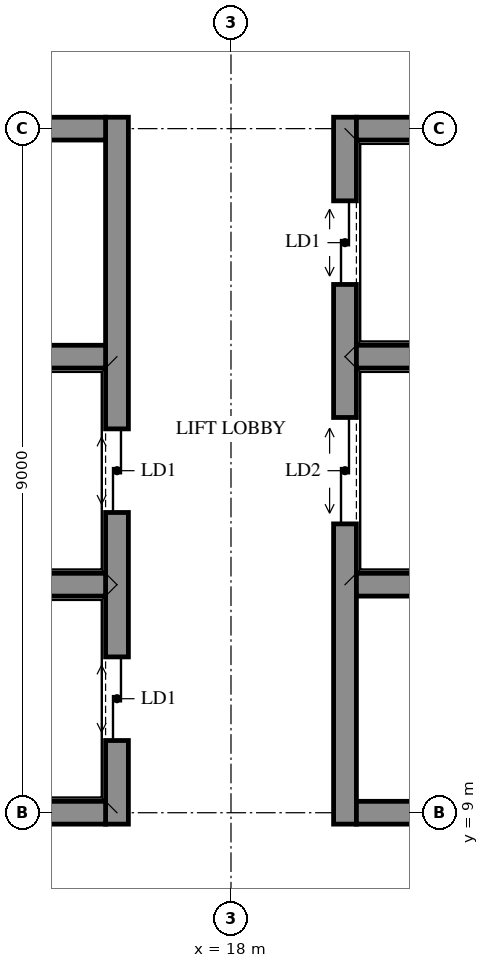
"""IFC4 building model, lengths in metres.
Left out: names, types, materials, properties, quantities, classifications, styles, units other than length and angle.
Written with IfcOpenShell. Run it as: python <this file> out.ifc"""

import sys

from ifc_helpers import new_model, si_unit, direction, frame, frame_2d, origin, place, context, subcontext, project, spatial, rectangle, extrude, element, fill, save


model = new_model("IFC4")
c1 = context("Model", 3, precision=1e-05, world=origin(), true_north=direction((0.0, 1.0)))
c2 = subcontext(c1, "Body", "Model", "MODEL_VIEW")
j1 = project(units=[si_unit("LENGTHUNIT", "METRE"), si_unit("PLANEANGLEUNIT", "RADIAN")], contexts=[c1])
p1 = place(None, origin())
s1 = spatial("IfcSite", under=j1, at=p1, CompositionType="ELEMENT")
p2 = place(p1, origin())
s2 = spatial("IfcBuilding", under=s1, at=p2, CompositionType="ELEMENT")
p3 = place(p2, frame((0.0, 0.0, 27.6)))
s3 = spatial("IfcBuildingStorey", under=s2, at=p3, CompositionType="ELEMENT", Elevation=27.6)
p4 = place(p3, frame((16.5, 8.85, 0.0), z_axis=(0.0, 0.0, 1.0), x_axis=(0.0, 1.0, 0.0)))
e1 = element("IfcWall", 1, at=p4, inside=s3, PredefinedType="SHEAR", context=c2, shape_type="SweptSolid", body=[
    extrude(rectangle(XDim=9.3, YDim=0.3, at=frame_2d((4.65, 0.0))), origin(), (0.0, 0.0, 1.0), 4.2),
])
p5 = place(p4, frame((1.1, 0.0, 0.0)))
e2 = element("IfcOpeningElement", 2, at=p5, cuts=e1, PredefinedType="OPENING", context=c2, shape_type="SweptSolid", body=[
    extrude(rectangle(XDim=1.1, YDim=2.1, at=frame_2d((0.55, 1.05))), frame((0.0, 0.16, 0.0), z_axis=(0.0, -1.0, 0.0), x_axis=(1.0, 0.0, 0.0)), (0.0, 0.0, 1.0), 0.32),
])
p6 = place(p4, frame((4.1, 0.0, 0.0)))
e3 = element("IfcOpeningElement", 3, at=p6, cuts=e1, PredefinedType="OPENING", context=c2, shape_type="SweptSolid", body=[
    extrude(rectangle(XDim=1.1, YDim=2.1, at=frame_2d((0.55, 1.05))), frame((0.0, 0.16, 0.0), z_axis=(0.0, -1.0, 0.0), x_axis=(1.0, 0.0, 0.0)), (0.0, 0.0, 1.0), 0.32),
])
p7 = place(p3, frame((19.5, 8.85, 0.0), z_axis=(0.0, 0.0, 1.0), x_axis=(0.0, 1.0, 0.0)))
e4 = element("IfcWall", 4, at=p7, inside=s3, PredefinedType="SHEAR", context=c2, shape_type="SweptSolid", body=[
    extrude(rectangle(XDim=9.3, YDim=0.3, at=frame_2d((4.65, 0.0))), origin(), (0.0, 0.0, 1.0), 4.2),
])
p8 = place(p7, frame((3.95, 0.0, 0.0)))
e5 = element("IfcOpeningElement", 5, at=p8, cuts=e4, PredefinedType="OPENING", context=c2, shape_type="SweptSolid", body=[
    extrude(rectangle(XDim=1.4, YDim=2.1, at=frame_2d((0.7, 1.05))), frame((0.0, 0.16, 0.0), z_axis=(0.0, -1.0, 0.0), x_axis=(1.0, 0.0, 0.0)), (0.0, 0.0, 1.0), 0.32),
])
p9 = place(p7, frame((7.1, 0.0, 0.0)))
e6 = element("IfcOpeningElement", 6, at=p9, cuts=e4, PredefinedType="OPENING", context=c2, shape_type="SweptSolid", body=[
    extrude(rectangle(XDim=1.1, YDim=2.1, at=frame_2d((0.55, 1.05))), frame((0.0, 0.16, 0.0), z_axis=(0.0, -1.0, 0.0), x_axis=(1.0, 0.0, 0.0)), (0.0, 0.0, 1.0), 0.32),
])
for number, where, z_axis, x_axis in (
    (7, (13.65, 9.0, 0.0), (0.0, 0.0, 1.0), (1.0, 0.0, 0.0)),
    (8, (19.65, 9.0, 0.0), (0.0, 0.0, 1.0), (1.0, 0.0, 0.0)),
    (9, (13.65, 12.0, 0.0), (0.0, 0.0, 1.0), (1.0, 0.0, 0.0)),
    (10, (19.65, 12.0, 0.0), (0.0, 0.0, 1.0), (1.0, 0.0, 0.0)),
    (11, (13.65, 15.0, 0.0), (0.0, 0.0, 1.0), (1.0, 0.0, 0.0)),
    (12, (19.65, 15.0, 0.0), (0.0, 0.0, 1.0), (1.0, 0.0, 0.0)),
    (13, (13.65, 18.0, 0.0), (0.0, 0.0, 1.0), (1.0, 0.0, 0.0)),
    (14, (19.65, 18.0, 0.0), (0.0, 0.0, 1.0), (1.0, 0.0, 0.0)),
):
    element("IfcWall", number, at=place(p3, frame(where, z_axis=z_axis, x_axis=x_axis)), inside=s3, PredefinedType="SHEAR", context=c2, shape_type="SweptSolid", body=[
        extrude(rectangle(XDim=2.7, YDim=0.3, at=frame_2d((1.35, 0.0))), origin(), (0.0, 0.0, 1.0), 4.2),
    ])
p10 = place(p5, origin())
e15 = element("IfcDoor", 15, at=p10, inside=s3, OperationType="DOUBLE_DOOR_SLIDING", PredefinedType="DOOR", context=c2, shape_type="SweptSolid", body=[
    extrude(rectangle(XDim=1.1, YDim=2.1, at=frame_2d((0.55, 1.05))), frame((0.0, 0.025, 0.0), z_axis=(0.0, -1.0, 0.0), x_axis=(1.0, 0.0, 0.0)), (0.0, 0.0, 1.0), 0.05),
])
fill(e2, e15)
p11 = place(p6, origin())
e16 = element("IfcDoor", 16, at=p11, inside=s3, OperationType="DOUBLE_DOOR_SLIDING", PredefinedType="DOOR", context=c2, shape_type="SweptSolid", body=[
    extrude(rectangle(XDim=1.1, YDim=2.1, at=frame_2d((0.55, 1.05))), frame((0.0, 0.025, 0.0), z_axis=(0.0, -1.0, 0.0), x_axis=(1.0, 0.0, 0.0)), (0.0, 0.0, 1.0), 0.05),
])
fill(e3, e16)
p12 = place(p8, origin())
e17 = element("IfcDoor", 17, at=p12, inside=s3, OperationType="DOUBLE_DOOR_SLIDING", PredefinedType="DOOR", context=c2, shape_type="SweptSolid", body=[
    extrude(rectangle(XDim=1.4, YDim=2.1, at=frame_2d((0.7, 1.05))), frame((0.0, 0.025, 0.0), z_axis=(0.0, -1.0, 0.0), x_axis=(1.0, 0.0, 0.0)), (0.0, 0.0, 1.0), 0.05),
])
fill(e5, e17)
p13 = place(p9, origin())
e18 = element("IfcDoor", 18, at=p13, inside=s3, OperationType="DOUBLE_DOOR_SLIDING", PredefinedType="DOOR", context=c2, shape_type="SweptSolid", body=[
    extrude(rectangle(XDim=1.1, YDim=2.1, at=frame_2d((0.55, 1.05))), frame((0.0, 0.025, 0.0), z_axis=(0.0, -1.0, 0.0), x_axis=(1.0, 0.0, 0.0)), (0.0, 0.0, 1.0), 0.05),
])
fill(e6, e18)
save(model, sys.argv[1])
